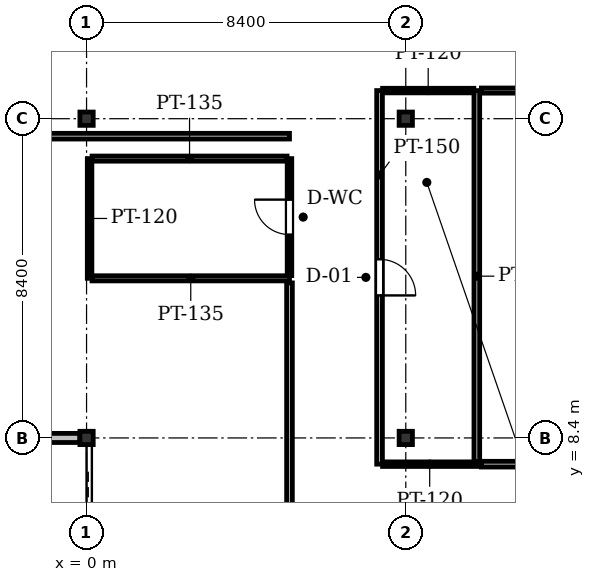
"""IFC4 building model, lengths in metres.
Left out: names, types, materials, properties, quantities, classifications, styles, units other than length and angle.
Written with IfcOpenShell. Run it as: python <this file> out.ifc"""

import sys

from ifc_helpers import new_model, si_unit, direction, frame, frame_2d, origin, origin_2d, place, context, subcontext, project, spatial, rectangle, i_section, extrude, element, fill, save


model = new_model("IFC4")
c1 = context("Model", 3, precision=1e-05, world=origin(), true_north=direction((0.0, 1.0)))
c2 = subcontext(c1, "Body", "Model", "MODEL_VIEW")
j1 = project(units=[si_unit("LENGTHUNIT", "METRE"), si_unit("PLANEANGLEUNIT", "RADIAN")], contexts=[c1])
p1 = place(None, origin())
s1 = spatial("IfcSite", under=j1, at=p1, CompositionType="ELEMENT")
p2 = place(p1, origin())
s2 = spatial("IfcBuilding", under=s1, at=p2, CompositionType="ELEMENT")
p3 = place(p2, frame((0.0, 0.0, 171.4)))
s3 = spatial("IfcBuildingStorey", under=s2, at=p3, CompositionType="ELEMENT", Elevation=171.4)
for number, where, z_axis, x_axis in (
    (1, (0.0, 8.4, 0.0), (0.0, 0.0, 1.0), (1.0, 0.0, 0.0)),
    (2, (0.0, 16.8, 0.0), (0.0, 0.0, 1.0), (1.0, 0.0, 0.0)),
    (3, (8.4, 8.4, 0.0), (0.0, 0.0, 1.0), (1.0, 0.0, 0.0)),
    (4, (8.4, 16.8, 0.0), (0.0, 0.0, 1.0), (1.0, 0.0, 0.0)),
):
    element("IfcColumn", number, at=place(p3, frame(where, z_axis=z_axis, x_axis=x_axis)), inside=s3, PredefinedType="COLUMN", context=c2, shape_type="SweptSolid", body=[
        extrude(i_section(OverallWidth=0.35, OverallDepth=0.35, WebThickness=0.02, FlangeThickness=0.032, at=origin_2d()), origin(), (0.0, 0.0, 1.0), 4.1),
    ])
p4 = place(p3, frame((-0.175, 8.4, 0.0), z_axis=(0.0, 0.0, 1.0), x_axis=(-1.0, 0.0, 0.0)))
e5 = element("IfcWall", 5, at=p4, inside=s3, PredefinedType="STANDARD", context=c2, shape_type="SweptSolid", body=[
    extrude(rectangle(XDim=7.169, YDim=0.24, at=frame_2d((3.585, 0.0))), origin(), (0.0, 0.0, 1.0), 2.915),
])
p5 = place(p3, frame((0.08, 15.75, 0.0), z_axis=(0.0, 0.0, 1.0), x_axis=(0.0, -1.0, 0.0)))
e6 = element("IfcWall", 6, at=p5, inside=s3, PredefinedType="PARTITIONING", context=c2, shape_type="SweptSolid", body=[
    extrude(rectangle(XDim=3.15, YDim=0.12, at=frame_2d((1.575, 0.0))), origin(), (0.0, 0.0, 1.0), 3.223),
])
p6 = place(p3, frame((0.144, 12.6, 0.0), z_axis=(0.0, 0.0, 1.0), x_axis=(1.0, 0.0, 0.0)))
e7 = element("IfcWall", 7, at=p6, inside=s3, PredefinedType="PARTITIONING", context=c2, shape_type="SweptSolid", body=[
    extrude(rectangle(XDim=5.196, YDim=0.135, at=frame_2d((2.598, 0.0))), origin(), (0.0, 0.0, 1.0), 3.518),
])
p7 = place(p3, frame((5.34, 12.671, 0.0), z_axis=(0.0, 0.0, 1.0), x_axis=(0.0, 1.0, 0.0)))
e8 = element("IfcWall", 8, at=p7, inside=s3, PredefinedType="PARTITIONING", context=c2, shape_type="SweptSolid", body=[
    extrude(rectangle(XDim=3.079, YDim=0.12, at=frame_2d((1.539, 0.0))), origin(), (0.0, 0.0, 1.0), 3.825),
])
p8 = place(p7, frame((1.079, 0.0, 0.0)))
e9 = element("IfcOpeningElement", 9, at=p8, cuts=e8, PredefinedType="OPENING", context=c2, shape_type="SweptSolid", body=[
    extrude(rectangle(XDim=0.92, YDim=2.1, at=frame_2d((0.46, 1.05))), frame((0.0, 0.07, 0.0), z_axis=(0.0, -1.0, 0.0), x_axis=(1.0, 0.0, 0.0)), (0.0, 0.0, 1.0), 0.14),
])
p9 = place(p3, frame((5.276, 15.75, 0.0), z_axis=(0.0, 0.0, 1.0), x_axis=(-1.0, 0.0, 0.0)))
e10 = element("IfcWall", 10, at=p9, inside=s3, PredefinedType="PARTITIONING", context=c2, shape_type="SweptSolid", body=[
    extrude(rectangle(XDim=5.132, YDim=0.135, at=frame_2d((2.566, 0.0))), origin(), (0.0, 0.0, 1.0), 3.518),
])
p10 = place(p3, frame((7.71, 17.54, 0.0), z_axis=(0.0, 0.0, 1.0), x_axis=(0.0, -1.0, 0.0)))
e11 = element("IfcWall", 11, at=p10, inside=s3, PredefinedType="PARTITIONING", context=c2, shape_type="SweptSolid", body=[
    extrude(rectangle(XDim=9.83, YDim=0.15, at=frame_2d((4.915, 0.0))), origin(), (0.0, 0.0, 1.0), 3.213),
])
p11 = place(p10, frame((4.44, 0.0, 0.0)))
e12 = element("IfcOpeningElement", 12, at=p11, cuts=e11, PredefinedType="OPENING", context=c2, shape_type="SweptSolid", body=[
    extrude(rectangle(XDim=0.95, YDim=2.15, at=frame_2d((0.475, 1.075))), frame((0.0, 0.085, 0.0), z_axis=(0.0, -1.0, 0.0), x_axis=(1.0, 0.0, 0.0)), (0.0, 0.0, 1.0), 0.17),
])
p12 = place(p3, frame((7.789, 7.71, 0.0), z_axis=(0.0, 0.0, 1.0), x_axis=(1.0, 0.0, 0.0)))
e13 = element("IfcWall", 13, at=p12, inside=s3, PredefinedType="PARTITIONING", context=c2, shape_type="SweptSolid", body=[
    extrude(rectangle(XDim=2.481, YDim=0.12, at=frame_2d((1.24, 0.0))), origin(), (0.0, 0.0, 1.0), 3.371),
])
p13 = place(p3, frame((10.27, 7.774, 0.0), z_axis=(0.0, 0.0, 1.0), x_axis=(0.0, 1.0, 0.0)))
e14 = element("IfcWall", 14, at=p13, inside=s3, PredefinedType="PARTITIONING", context=c2, shape_type="SweptSolid", body=[
    extrude(rectangle(XDim=9.766, YDim=0.15, at=frame_2d((4.883, 0.0))), origin(), (0.0, 0.0, 1.0), 3.365),
])
p14 = place(p3, frame((10.191, 17.54, 0.0), z_axis=(0.0, 0.0, 1.0), x_axis=(-1.0, 0.0, 0.0)))
e15 = element("IfcWall", 15, at=p14, inside=s3, PredefinedType="PARTITIONING", context=c2, shape_type="SweptSolid", body=[
    extrude(rectangle(XDim=2.402, YDim=0.12, at=frame_2d((1.201, 0.0))), origin(), (0.0, 0.0, 1.0), 3.371),
])
p15 = place(p3, frame((5.34, 5.4, 0.0), z_axis=(0.0, 0.0, 1.0), x_axis=(0.0, 1.0, 0.0)))
e16 = element("IfcWall", 16, at=p15, inside=s3, PredefinedType="PARTITIONING", context=c2, shape_type="SweptSolid", body=[
    extrude(rectangle(XDim=7.08, YDim=0.15, at=frame_2d((3.54, 0.0))), origin(), (0.0, 0.0, 1.0), 3.213),
])
p16 = place(p3, frame((5.34, 16.34, 0.0), z_axis=(0.0, 0.0, 1.0), x_axis=(-1.0, 0.0, 0.0)))
e17 = element("IfcWall", 17, at=p16, inside=s3, PredefinedType="PARTITIONING", context=c2, shape_type="SweptSolid", body=[
    extrude(rectangle(XDim=8.54, YDim=0.15, at=frame_2d((4.27, 0.0))), origin(), (0.0, 0.0, 1.0), 3.223),
])
p17 = place(p3, frame((14.261, 17.54, 0.0), z_axis=(0.0, 0.0, 1.0), x_axis=(-1.0, 0.0, 0.0)))
e18 = element("IfcWall", 18, at=p17, inside=s3, PredefinedType="PARTITIONING", context=c2, shape_type="SweptSolid", body=[
    extrude(rectangle(XDim=3.871, YDim=0.135, at=frame_2d((1.936, 0.0))), origin(), (0.0, 0.0, 1.0), 3.825),
])
p18 = place(p3, frame((10.39, 7.71, 0.0), z_axis=(0.0, 0.0, 1.0), x_axis=(1.0, 0.0, 0.0)))
e19 = element("IfcWall", 19, at=p18, inside=s3, PredefinedType="PARTITIONING", context=c2, shape_type="SweptSolid", body=[
    extrude(rectangle(XDim=5.91, YDim=0.15, at=frame_2d((2.955, 0.0))), origin(), (0.0, 0.0, 1.0), 3.518),
])
p19 = place(p8, origin())
e20 = element("IfcDoor", 20, at=p19, inside=s3, OperationType="SINGLE_SWING_RIGHT", PredefinedType="DOOR", context=c2, shape_type="SweptSolid", body=[
    extrude(rectangle(XDim=0.92, YDim=2.1, at=frame_2d((0.46, 1.05))), frame((0.0, 0.025, 0.0), z_axis=(0.0, -1.0, 0.0), x_axis=(1.0, 0.0, 0.0)), (0.0, 0.0, 1.0), 0.05),
])
fill(e9, e20)
p20 = place(p11, origin())
e21 = element("IfcDoor", 21, at=p20, inside=s3, OperationType="SINGLE_SWING_RIGHT", PredefinedType="DOOR", context=c2, shape_type="SweptSolid", body=[
    extrude(rectangle(XDim=0.95, YDim=2.15, at=frame_2d((0.475, 1.075))), frame((0.0, 0.025, 0.0), z_axis=(0.0, -1.0, 0.0), x_axis=(1.0, 0.0, 0.0)), (0.0, 0.0, 1.0), 0.05),
])
fill(e12, e21)
save(model, sys.argv[1])
